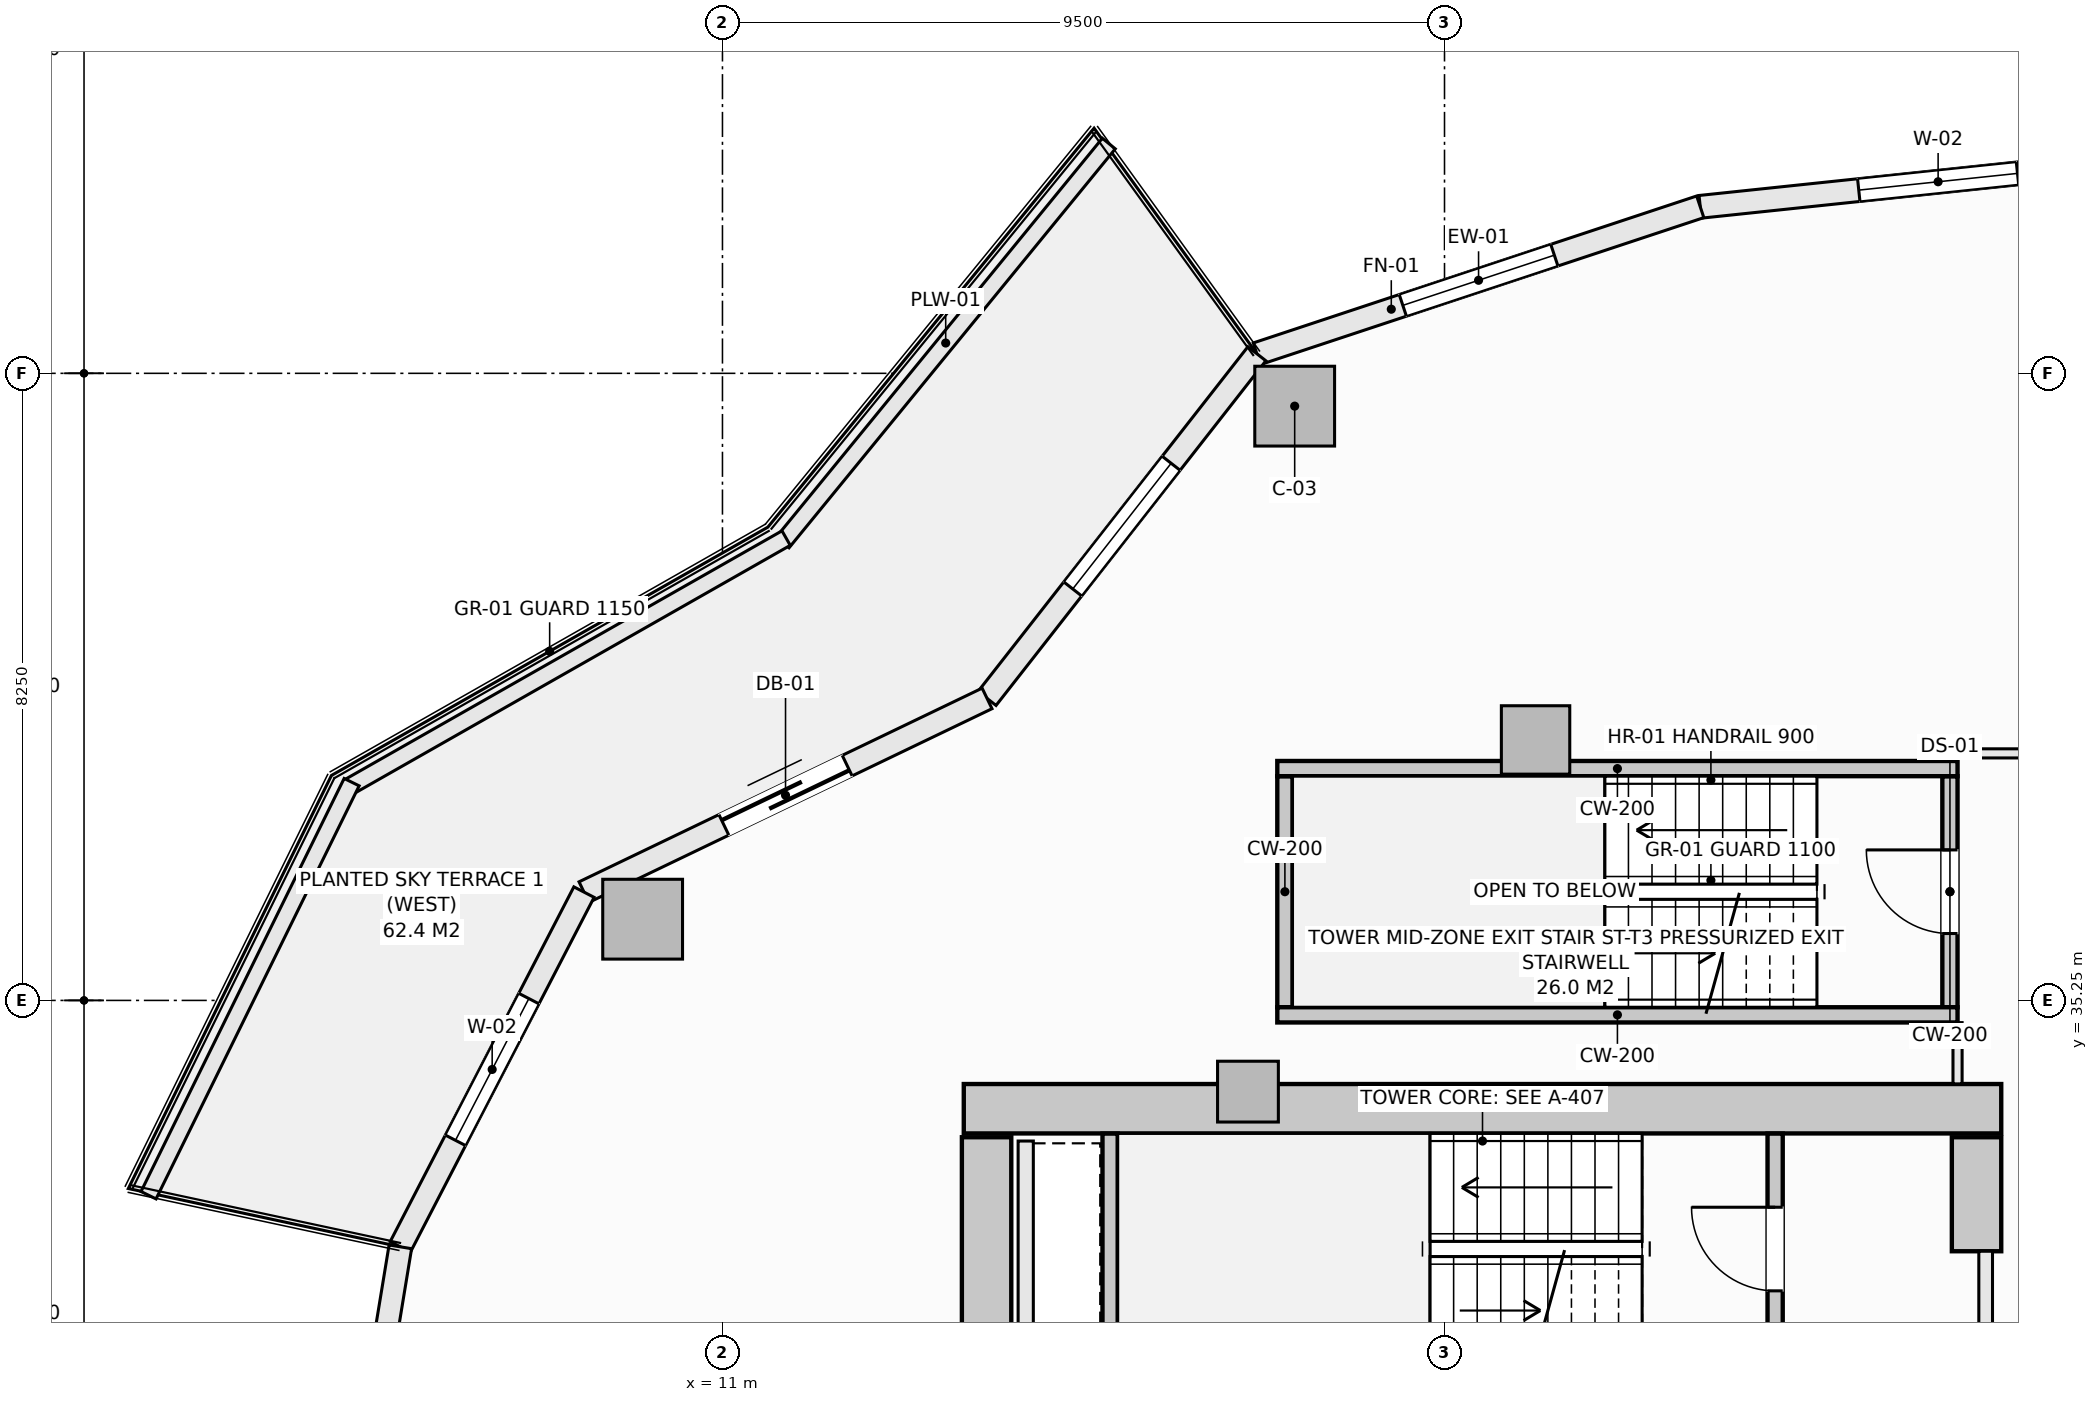
"""IFC4 building model, lengths in metres.
Left out: names, types, materials, properties, quantities, classifications, styles, units other than length and angle.
Written with IfcOpenShell. Run it as: python <this file> out.ifc"""

import sys

from ifc_helpers import new_model, si_unit, direction, frame, frame_2d, origin, origin_2d, place, context, subcontext, project, spatial, rectangle, extrude, element, fill, save


model = new_model("IFC4")
c1 = context("Model", 3, precision=1e-05, world=origin(), true_north=direction((0.0, 1.0)))
c2 = subcontext(c1, "Body", "Model", "MODEL_VIEW")
j1 = project(units=[si_unit("LENGTHUNIT", "METRE"), si_unit("PLANEANGLEUNIT", "RADIAN")], contexts=[c1])
p1 = place(None, origin())
s1 = spatial("IfcSite", under=j1, at=p1, CompositionType="ELEMENT")
p2 = place(p1, origin())
s2 = spatial("IfcBuilding", under=s1, at=p2, CompositionType="ELEMENT")
p3 = place(p2, frame((0.0, 0.0, 129.1)))
s3 = spatial("IfcBuildingStorey", under=s2, at=p3, CompositionType="ELEMENT", Elevation=129.1)
p4 = place(p3, frame((14.175, 33.825, -0.27), z_axis=(0.0, 0.0, 1.0), x_axis=(1.0, 0.0, 0.0)))
e1 = element("IfcWall", 1, at=p4, inside=s3, PredefinedType="SHEAR", context=c2, shape_type="SweptSolid", body=[
    extrude(rectangle(XDim=13.65, YDim=0.65, at=frame_2d((6.825, 0.0))), origin(), (0.0, 0.0, 1.0), 3.4),
])
p5 = place(p3, frame((14.475, 20.55, -0.27), z_axis=(0.0, 0.0, 1.0), x_axis=(0.0, 1.0, 0.0)))
e2 = element("IfcWall", 2, at=p5, inside=s3, PredefinedType="SHEAR", context=c2, shape_type="SweptSolid", body=[
    extrude(rectangle(XDim=12.9, YDim=0.65, at=frame_2d((6.45, 0.0))), origin(), (0.0, 0.0, 1.0), 3.4),
])
p6 = place(p3, frame((27.5, 31.95, -0.27), z_axis=(0.0, 0.0, 1.0), x_axis=(0.0, 1.0, 0.0)))
e3 = element("IfcWall", 3, at=p6, inside=s3, PredefinedType="SHEAR", context=c2, shape_type="SweptSolid", body=[
    extrude(rectangle(XDim=1.5, YDim=0.65, at=frame_2d((0.75, 0.0))), origin(), (0.0, 0.0, 1.0), 3.4),
])
for number, where, z_axis, x_axis in (
    (4, (18.529, 43.068, -0.27), (0.0, 0.0, 1.0), (1.0, 0.0, 0.0)),
    (5, (9.95, 36.319, -0.27), (0.0, 0.0, 1.0), (1.0, 0.0, 0.0)),
):
    element("IfcColumn", number, at=place(p3, frame(where, z_axis=z_axis, x_axis=x_axis)), inside=s3, PredefinedType="COLUMN", context=c2, shape_type="SweptSolid", body=[
        extrude(rectangle(XDim=1.05, YDim=1.05, at=origin_2d()), origin(), (0.0, 0.0, 1.0), 3.4),
    ])
p7 = place(p3, frame((21.698, 38.677, -0.27), z_axis=(0.0, 0.0, 1.0), x_axis=(1.0, 0.0, 0.0)))
e6 = element("IfcColumn", 6, at=p7, inside=s3, PredefinedType="COLUMN", context=c2, shape_type="SweptSolid", body=[
    extrude(rectangle(XDim=0.9, YDim=0.9, at=origin_2d()), origin(), (0.0, 0.0, 1.0), 3.4),
])
p8 = place(p3, frame((17.914, 34.05, -0.27), z_axis=(0.0, 0.0, 1.0), x_axis=(1.0, 0.0, 0.0)))
e7 = element("IfcColumn", 7, at=p8, inside=s3, PredefinedType="PILASTER", context=c2, shape_type="SweptSolid", body=[
    extrude(rectangle(XDim=0.8, YDim=0.8, at=origin_2d()), origin(), (0.0, 0.0, 1.0), 3.4),
])
p9 = place(p3, frame((23.865, 45.691, 0.0), z_axis=(0.0, 0.0, 1.0), x_axis=(0.994498012394, 0.104755445421, 0.0)))
e8 = element("IfcWall", 8, at=p9, inside=s3, PredefinedType="SOLIDWALL", context=c2, shape_type="SweptSolid", body=[
    extrude(rectangle(XDim=6.295, YDim=0.3, at=frame_2d((3.147, 0.0))), origin(), (0.0, 0.0, 1.0), 2.653),
])
p10 = place(p9, frame((2.097, 0.0, 0.74)))
e9 = element("IfcOpeningElement", 9, at=p10, cuts=e8, PredefinedType="OPENING", context=c2, shape_type="SweptSolid", body=[
    extrude(rectangle(XDim=2.1, YDim=1.7, at=frame_2d((1.05, 0.85))), frame((0.0, 0.16, 0.0), z_axis=(0.0, -1.0, 0.0), x_axis=(1.0, 0.0, 0.0)), (0.0, 0.0, 1.0), 0.32),
])
p11 = place(p3, frame((18.031, 43.758, 0.0), z_axis=(0.0, 0.0, 1.0), x_axis=(0.949238009374, 0.314558741032, 0.0)))
e10 = element("IfcWall", 10, at=p11, inside=s3, PredefinedType="SOLIDWALL", context=c2, shape_type="SweptSolid", body=[
    extrude(rectangle(XDim=6.146, YDim=0.3, at=frame_2d((3.073, 0.0))), origin(), (0.0, 0.0, 1.0), 2.653),
])
p12 = place(p11, frame((2.023, 0.0, 0.74)))
e11 = element("IfcOpeningElement", 11, at=p12, cuts=e10, PredefinedType="OPENING", context=c2, shape_type="SweptSolid", body=[
    extrude(rectangle(XDim=2.1, YDim=1.7, at=frame_2d((1.05, 0.85))), frame((0.0, 0.16, 0.0), z_axis=(0.0, -1.0, 0.0), x_axis=(1.0, 0.0, 0.0)), (0.0, 0.0, 1.0), 0.32),
])
p13 = place(p3, frame((14.481, 39.223, 0.0), z_axis=(0.0, 0.0, 1.0), x_axis=(0.616435134162, 0.787405693001, 0.0)))
e12 = element("IfcWall", 12, at=p13, inside=s3, PredefinedType="SOLIDWALL", context=c2, shape_type="SweptSolid", body=[
    extrude(rectangle(XDim=5.759, YDim=0.3, at=frame_2d((2.879, 0.0))), origin(), (0.0, 0.0, 1.0), 2.653),
])
p14 = place(p13, frame((1.829, 0.0, 0.74)))
e13 = element("IfcOpeningElement", 13, at=p14, cuts=e12, PredefinedType="OPENING", context=c2, shape_type="SweptSolid", body=[
    extrude(rectangle(XDim=2.1, YDim=1.7, at=frame_2d((1.05, 0.85))), frame((0.0, 0.16, 0.0), z_axis=(0.0, -1.0, 0.0), x_axis=(1.0, 0.0, 0.0)), (0.0, 0.0, 1.0), 0.32),
])
p15 = place(p3, frame((9.178, 36.675, 0.0), z_axis=(0.0, 0.0, 1.0), x_axis=(0.901370184739, 0.433049408339, 0.0)))
e14 = element("IfcWall", 14, at=p15, inside=s3, PredefinedType="SOLIDWALL", context=c2, shape_type="SweptSolid", body=[
    extrude(rectangle(XDim=5.884, YDim=0.3, at=frame_2d((2.942, 0.0))), origin(), (0.0, 0.0, 1.0), 2.653),
])
p16 = place(p15, frame((2.042, 0.0, 0.0)))
e15 = element("IfcOpeningElement", 15, at=p16, cuts=e14, PredefinedType="OPENING", context=c2, shape_type="SweptSolid", body=[
    extrude(rectangle(XDim=1.8, YDim=2.25, at=frame_2d((0.9, 1.125))), frame((0.0, 0.16, 0.0), z_axis=(0.0, -1.0, 0.0), x_axis=(1.0, 0.0, 0.0)), (0.0, 0.0, 1.0), 0.32),
])
p17 = place(p3, frame((6.762, 32.008, 0.0), z_axis=(0.0, 0.0, 1.0), x_axis=(0.459767899643, 0.888039119892, 0.0)))
e16 = element("IfcWall", 16, at=p17, inside=s3, PredefinedType="SOLIDWALL", context=c2, shape_type="SweptSolid", body=[
    extrude(rectangle(XDim=5.255, YDim=0.3, at=frame_2d((2.628, 0.0))), origin(), (0.0, 0.0, 1.0), 2.653),
])
p18 = place(p17, frame((1.578, 0.0, 0.74)))
e17 = element("IfcOpeningElement", 17, at=p18, cuts=e16, PredefinedType="OPENING", context=c2, shape_type="SweptSolid", body=[
    extrude(rectangle(XDim=2.1, YDim=1.7, at=frame_2d((1.05, 0.85))), frame((0.0, 0.16, 0.0), z_axis=(0.0, -1.0, 0.0), x_axis=(1.0, 0.0, 0.0)), (0.0, 0.0, 1.0), 0.32),
])
p19 = place(p3, frame((5.938, 27.0, 0.0), z_axis=(0.0, 0.0, 1.0), x_axis=(0.162393944769, 0.986726003864, 0.0)))
e18 = element("IfcWall", 18, at=p19, inside=s3, PredefinedType="SOLIDWALL", context=c2, shape_type="SweptSolid", body=[
    extrude(rectangle(XDim=5.075, YDim=0.3, at=frame_2d((2.538, 0.0))), origin(), (0.0, 0.0, 1.0), 2.653),
])
p20 = place(p19, frame((1.85, 0.0, 0.74)))
e19 = element("IfcOpeningElement", 19, at=p20, cuts=e18, PredefinedType="OPENING", context=c2, shape_type="SweptSolid", body=[
    extrude(rectangle(XDim=2.1, YDim=1.7, at=frame_2d((1.05, 0.85))), frame((0.0, 0.16, 0.0), z_axis=(0.0, -1.0, 0.0), x_axis=(1.0, 0.0, 0.0)), (0.0, 0.0, 1.0), 0.32),
])
p21 = place(p3, frame((11.791, 41.274, 0.0), z_axis=(0.0, 0.0, 1.0), x_axis=(0.633024046468, 0.774132131224, 0.0)))
e20 = element("IfcWall", 20, at=p21, inside=s3, PredefinedType="PARAPET", context=c2, shape_type="SweptSolid", body=[
    extrude(rectangle(XDim=6.781, YDim=0.22, at=frame_2d((3.39, 0.0))), origin(), (0.0, 0.0, 1.0), 0.52),
])
p22 = place(p3, frame((6.095, 38.066, 0.0), z_axis=(0.0, 0.0, 1.0), x_axis=(0.869187658335, 0.494482370361, 0.0)))
e21 = element("IfcWall", 21, at=p22, inside=s3, PredefinedType="PARAPET", context=c2, shape_type="SweptSolid", body=[
    extrude(rectangle(XDim=6.606, YDim=0.22, at=frame_2d((3.303, 0.0))), origin(), (0.0, 0.0, 1.0), 0.52),
])
p23 = place(p3, frame((3.449, 32.687, 0.0), z_axis=(0.0, 0.0, 1.0), x_axis=(0.441269631716, 0.897374566235, 0.0)))
e22 = element("IfcWall", 22, at=p23, inside=s3, PredefinedType="PARAPET", context=c2, shape_type="SweptSolid", body=[
    extrude(rectangle(XDim=6.056, YDim=0.22, at=frame_2d((3.028, 0.0))), origin(), (0.0, 0.0, 1.0), 0.52),
])
p24 = place(p3, frame((24.85, 30.46, -0.27), z_axis=(0.0, 0.0, 1.0), x_axis=(0.0, 1.0, 0.0)))
e23 = element("IfcWall", 23, at=p24, inside=s3, PredefinedType="SHEAR", context=c2, shape_type="SweptSolid", body=[
    extrude(rectangle(XDim=3.038, YDim=0.2, at=frame_2d((1.519, 0.0))), origin(), (0.0, 0.0, 1.0), 3.4),
])
p25 = place(p24, frame((0.969, 0.0, 0.27)))
e24 = element("IfcOpeningElement", 24, at=p25, cuts=e23, PredefinedType="OPENING", context=c2, shape_type="SweptSolid", body=[
    extrude(rectangle(XDim=1.1, YDim=2.15, at=frame_2d((0.55, 1.075))), frame((0.0, 0.11, 0.0), z_axis=(0.0, -1.0, 0.0), x_axis=(1.0, 0.0, 0.0)), (0.0, 0.0, 1.0), 0.22),
])
p26 = place(p3, frame((16.1, 30.462, -0.27), z_axis=(0.0, 0.0, 1.0), x_axis=(0.0, 1.0, 0.0)))
e25 = element("IfcWall", 25, at=p26, inside=s3, PredefinedType="SHEAR", context=c2, shape_type="SweptSolid", body=[
    extrude(rectangle(XDim=3.036, YDim=0.2, at=frame_2d((1.518, 0.0))), origin(), (0.0, 0.0, 1.0), 3.4),
])
p27 = place(p3, frame((27.15, 35.16, -0.27), z_axis=(0.0, 0.0, 1.0), x_axis=(0.0, 1.0, 0.0)))
e26 = element("IfcWall", 26, at=p27, inside=s3, PredefinedType="SHEAR", context=c2, shape_type="SweptSolid", body=[
    extrude(rectangle(XDim=3.04, YDim=0.2, at=frame_2d((1.52, 0.0))), origin(), (0.0, 0.0, 1.0), 3.4),
])
p28 = place(p27, frame((0.97, 0.0, 0.27)))
e27 = element("IfcOpeningElement", 27, at=p28, cuts=e26, PredefinedType="OPENING", context=c2, shape_type="SweptSolid", body=[
    extrude(rectangle(XDim=1.1, YDim=2.15, at=frame_2d((0.55, 1.075))), frame((0.0, 0.11, 0.0), z_axis=(0.0, -1.0, 0.0), x_axis=(1.0, 0.0, 0.0)), (0.0, 0.0, 1.0), 0.22),
])
p29 = place(p3, frame((18.4, 35.16, -0.27), z_axis=(0.0, 0.0, 1.0), x_axis=(0.0, 1.0, 0.0)))
e28 = element("IfcWall", 28, at=p29, inside=s3, PredefinedType="SHEAR", context=c2, shape_type="SweptSolid", body=[
    extrude(rectangle(XDim=3.04, YDim=0.2, at=frame_2d((1.52, 0.0))), origin(), (0.0, 0.0, 1.0), 3.4),
])
for number, where, z_axis, x_axis in (
    (29, (18.3, 38.3, -0.27), (0.0, 0.0, 1.0), (1.0, 0.0, 0.0)),
    (30, (18.3, 35.06, -0.27), (0.0, 0.0, 1.0), (1.0, 0.0, 0.0)),
):
    element("IfcWall", number, at=place(p3, frame(where, z_axis=z_axis, x_axis=x_axis)), inside=s3, PredefinedType="SHEAR", context=c2, shape_type="SweptSolid", body=[
        extrude(rectangle(XDim=8.95, YDim=0.2, at=frame_2d((4.475, 0.0))), origin(), (0.0, 0.0, 1.0), 3.4),
    ])
p30 = place(p3, frame((14.99, 30.55, 0.0), z_axis=(0.0, 0.0, 1.0), x_axis=(0.0, 1.0, 0.0)))
e31 = element("IfcWall", 31, at=p30, inside=s3, PredefinedType="SOLIDWALL", context=c2, shape_type="SweptSolid", body=[
    extrude(rectangle(XDim=2.85, YDim=0.2, at=frame_2d((1.425, 0.0))), origin(), (0.0, 0.0, 1.0), 3.13),
])
p31 = place(p3, frame((27.62, 22.05, 0.0), z_axis=(0.0, 0.0, 1.0), x_axis=(0.0, 1.0, 0.0)))
e32 = element("IfcWall", 32, at=p31, inside=s3, PredefinedType="SOLIDWALL", context=c2, shape_type="SweptSolid", body=[
    extrude(rectangle(XDim=9.9, YDim=0.18, at=frame_2d((4.95, 0.0))), origin(), (0.0, 0.0, 1.0), 3.13),
])
p32 = place(p31, frame((4.475, 0.0, 0.0)))
e33 = element("IfcOpeningElement", 33, at=p32, cuts=e32, PredefinedType="OPENING", context=c2, shape_type="SweptSolid", body=[
    extrude(rectangle(XDim=0.95, YDim=2.1, at=frame_2d((0.475, 1.05))), frame((0.0, 0.1, 0.0), z_axis=(0.0, -1.0, 0.0), x_axis=(1.0, 0.0, 0.0)), (0.0, 0.0, 1.0), 0.2),
])
p33 = place(p31, frame((6.89, 0.0, 0.0)))
e34 = element("IfcOpeningElement", 34, at=p33, cuts=e32, PredefinedType="OPENING", context=c2, shape_type="SweptSolid", body=[
    extrude(rectangle(XDim=1.5, YDim=2.2, at=frame_2d((0.75, 1.1))), frame((0.0, 0.1, 0.0), z_axis=(0.0, -1.0, 0.0), x_axis=(1.0, 0.0, 0.0)), (0.0, 0.0, 1.0), 0.2),
])
p34 = place(p31, frame((1.51, 0.0, 0.0)))
e35 = element("IfcOpeningElement", 35, at=p34, cuts=e32, PredefinedType="OPENING", context=c2, shape_type="SweptSolid", body=[
    extrude(rectangle(XDim=1.5, YDim=2.2, at=frame_2d((0.75, 1.1))), frame((0.0, 0.1, 0.0), z_axis=(0.0, -1.0, 0.0), x_axis=(1.0, 0.0, 0.0)), (0.0, 0.0, 1.0), 0.2),
])
p35 = place(p3, frame((27.25, 34.152, 0.0), z_axis=(0.0, 0.0, 1.0), x_axis=(0.0, 1.0, 0.0)))
e36 = element("IfcWall", 36, at=p35, inside=s3, PredefinedType="PARTITIONING", context=c2, shape_type="SweptSolid", body=[
    extrude(rectangle(XDim=0.806, YDim=0.12, at=frame_2d((0.403, 0.0))), origin(), (0.0, 0.0, 1.0), 3.13),
])
p36 = place(p3, frame((27.25, 38.5, 0.0), z_axis=(0.0, 0.0, 1.0), x_axis=(1.0, 0.0, 0.0)))
e37 = element("IfcWall", 37, at=p36, inside=s3, PredefinedType="PARTITIONING", context=c2, shape_type="SweptSolid", body=[
    extrude(rectangle(XDim=2.53, YDim=0.12, at=frame_2d((1.265, 0.0))), origin(), (0.0, 0.0, 1.0), 3.13),
])
p37 = place(p10, origin())
e38 = element("IfcWindow", 38, at=p37, inside=s3, PartitioningType="SINGLE_PANEL", PredefinedType="WINDOW", context=c2, shape_type="SweptSolid", body=[
    extrude(rectangle(XDim=2.1, YDim=1.7, at=frame_2d((1.05, 0.85))), frame((0.0, 0.03, 0.0), z_axis=(0.0, -1.0, 0.0), x_axis=(1.0, 0.0, 0.0)), (0.0, 0.0, 1.0), 0.06),
])
fill(e9, e38)
p38 = place(p12, origin())
e39 = element("IfcWindow", 39, at=p38, inside=s3, PartitioningType="SINGLE_PANEL", PredefinedType="WINDOW", context=c2, shape_type="SweptSolid", body=[
    extrude(rectangle(XDim=2.1, YDim=1.7, at=frame_2d((1.05, 0.85))), frame((0.0, 0.03, 0.0), z_axis=(0.0, -1.0, 0.0), x_axis=(1.0, 0.0, 0.0)), (0.0, 0.0, 1.0), 0.06),
])
fill(e11, e39)
p39 = place(p14, origin())
e40 = element("IfcWindow", 40, at=p39, inside=s3, PartitioningType="SINGLE_PANEL", PredefinedType="WINDOW", context=c2, shape_type="SweptSolid", body=[
    extrude(rectangle(XDim=2.1, YDim=1.7, at=frame_2d((1.05, 0.85))), frame((0.0, 0.03, 0.0), z_axis=(0.0, -1.0, 0.0), x_axis=(1.0, 0.0, 0.0)), (0.0, 0.0, 1.0), 0.06),
])
fill(e13, e40)
p40 = place(p16, origin())
e41 = element("IfcDoor", 41, at=p40, inside=s3, OperationType="SLIDING_TO_LEFT", PredefinedType="DOOR", context=c2, shape_type="SweptSolid", body=[
    extrude(rectangle(XDim=1.8, YDim=2.25, at=frame_2d((0.9, 1.125))), frame((0.0, 0.025, 0.0), z_axis=(0.0, -1.0, 0.0), x_axis=(1.0, 0.0, 0.0)), (0.0, 0.0, 1.0), 0.05),
])
fill(e15, e41)
p41 = place(p18, origin())
e42 = element("IfcWindow", 42, at=p41, inside=s3, PartitioningType="SINGLE_PANEL", PredefinedType="WINDOW", context=c2, shape_type="SweptSolid", body=[
    extrude(rectangle(XDim=2.1, YDim=1.7, at=frame_2d((1.05, 0.85))), frame((0.0, 0.03, 0.0), z_axis=(0.0, -1.0, 0.0), x_axis=(1.0, 0.0, 0.0)), (0.0, 0.0, 1.0), 0.06),
])
fill(e17, e42)
p42 = place(p25, origin())
e43 = element("IfcDoor", 43, at=p42, inside=s3, OperationType="SINGLE_SWING_RIGHT", PredefinedType="DOOR", context=c2, shape_type="SweptSolid", body=[
    extrude(rectangle(XDim=1.1, YDim=2.15, at=frame_2d((0.55, 1.075))), frame((0.0, 0.025, 0.0), z_axis=(0.0, -1.0, 0.0), x_axis=(1.0, 0.0, 0.0)), (0.0, 0.0, 1.0), 0.05),
])
fill(e24, e43)
p43 = place(p28, origin())
e44 = element("IfcDoor", 44, at=p43, inside=s3, OperationType="SINGLE_SWING_RIGHT", PredefinedType="DOOR", context=c2, shape_type="SweptSolid", body=[
    extrude(rectangle(XDim=1.1, YDim=2.15, at=frame_2d((0.55, 1.075))), frame((0.0, 0.025, 0.0), z_axis=(0.0, -1.0, 0.0), x_axis=(1.0, 0.0, 0.0)), (0.0, 0.0, 1.0), 0.05),
])
fill(e27, e44)
save(model, sys.argv[1])
